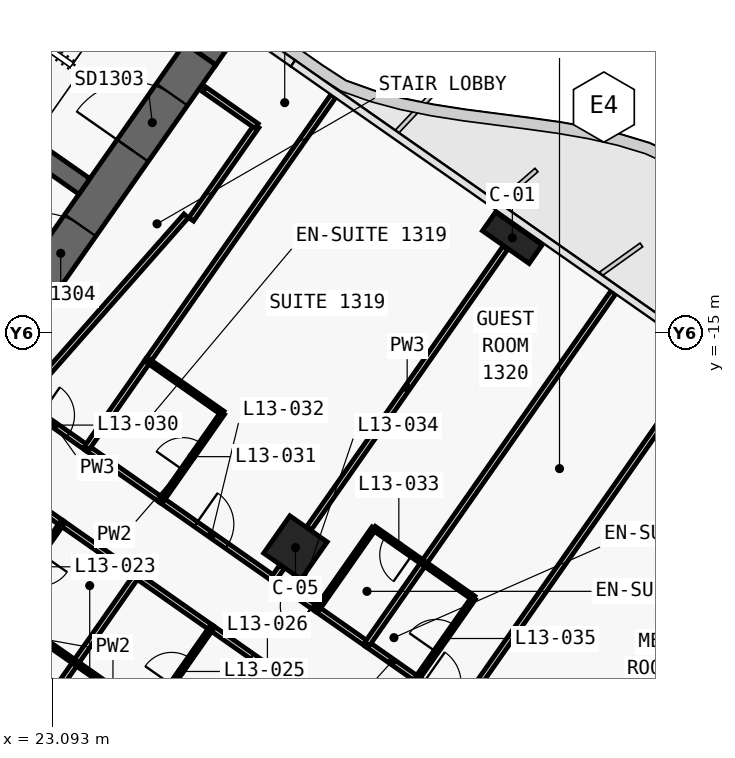
"""IFC4 building model, lengths in metres.
Left out: names, types, materials, properties, quantities, classifications, styles, units other than length and angle.
Written with IfcOpenShell. Run it as: python <this file> out.ifc"""

import sys

from ifc_helpers import new_model, si_unit, direction, frame, frame_2d, origin, origin_2d, place, context, subcontext, project, spatial, polyline, rectangle, outline, extrude, element, fill, save


model = new_model("IFC4")
c1 = context("Model", 3, precision=1e-05, world=origin(), true_north=direction((0.0, 1.0)))
c2 = subcontext(c1, "Body", "Model", "MODEL_VIEW")
j1 = project(units=[si_unit("LENGTHUNIT", "METRE"), si_unit("PLANEANGLEUNIT", "RADIAN")], contexts=[c1])
p1 = place(None, origin())
s1 = spatial("IfcSite", under=j1, at=p1, CompositionType="ELEMENT")
p2 = place(p1, origin())
s2 = spatial("IfcBuilding", under=s1, at=p2, CompositionType="ELEMENT")
p3 = place(p2, frame((0.0, 0.0, 72.5)))
s3 = spatial("IfcBuildingStorey", under=s2, at=p3, CompositionType="ELEMENT", Elevation=72.5)
p4 = place(p3, frame((-0.037, 11.867, 0.0), z_axis=(0.0, 0.0, 1.0), x_axis=(0.819155306259, -0.573571777746, 0.0)))
e1 = element("IfcWall", 1, at=p4, inside=s3, PredefinedType="SHEAR", context=c2, shape_type="SweptSolid", body=[
    extrude(outline(polyline([(33.837, 0.5), (0.0, 0.5), (0.7, -0.5), (33.837, -0.5), (33.837, 0.5)])), origin(), (0.0, 0.0, 1.0), 3.6),
])
p5 = place(p3, frame((21.708, -15.2, 0.0), z_axis=(0.0, 0.0, 1.0), x_axis=(0.573576324356, 0.819152122709, 0.0)))
e2 = element("IfcWall", 2, at=p5, inside=s3, PredefinedType="SHEAR", context=c2, shape_type="SweptSolid", body=[
    extrude(outline(polyline([(9.2, 0.5), (0.0, 0.5), (0.0, -0.5), (9.2, -0.5), (9.2, 0.5)])), origin(), (0.0, 0.0, 1.0), 3.6),
])
p6 = place(p5, frame((6.1, 0.0, 0.0)))
e3 = element("IfcOpeningElement", 3, at=p6, cuts=e2, PredefinedType="OPENING", context=c2, shape_type="SweptSolid", body=[
    extrude(rectangle(XDim=1.8, YDim=2.1, at=frame_2d((0.9, 1.05))), frame((0.0, 0.51, 0.0), z_axis=(0.0, -1.0, 0.0), x_axis=(1.0, 0.0, 0.0)), (0.0, 0.0, 1.0), 1.02),
])
p7 = place(p5, frame((1.9, 0.0, 0.0)))
e4 = element("IfcOpeningElement", 4, at=p7, cuts=e2, PredefinedType="OPENING", context=c2, shape_type="SweptSolid", body=[
    extrude(rectangle(XDim=1.8, YDim=2.1, at=frame_2d((0.9, 1.05))), frame((0.0, 0.51, 0.0), z_axis=(0.0, -1.0, 0.0), x_axis=(1.0, 0.0, 0.0)), (0.0, 0.0, 1.0), 1.02),
])
p8 = place(p3, frame((2.638, 3.768, 0.0), z_axis=(0.0, 0.0, 1.0), x_axis=(0.819148977158, -0.573580816643, 0.0)))
e5 = element("IfcWall", 5, at=p8, inside=s3, PredefinedType="SHEAR", context=c2, shape_type="SweptSolid", body=[
    extrude(outline(polyline([(0.0, 0.25), (0.0, -0.25), (26.0, -0.25), (26.0, 0.25), (0.0, 0.25)])), origin(), (0.0, 0.0, 1.0), 3.6),
])
p9 = place(p8, frame((9.637, 0.0, 0.0)))
e6 = element("IfcOpeningElement", 6, at=p9, cuts=e5, PredefinedType="OPENING", context=c2, shape_type="SweptSolid", body=[
    extrude(rectangle(XDim=1.2, YDim=2.1, at=frame_2d((0.6, 1.05))), frame((0.0, 0.26, 0.0), z_axis=(0.0, -1.0, 0.0), x_axis=(1.0, 0.0, 0.0)), (0.0, 0.0, 1.0), 0.52),
])
p10 = place(p8, frame((11.812, 0.0, 0.0)))
e7 = element("IfcOpeningElement", 7, at=p10, cuts=e5, PredefinedType="OPENING", context=c2, shape_type="SweptSolid", body=[
    extrude(rectangle(XDim=1.2, YDim=2.1, at=frame_2d((0.6, 1.05))), frame((0.0, 0.26, 0.0), z_axis=(0.0, -1.0, 0.0), x_axis=(1.0, 0.0, 0.0)), (0.0, 0.0, 1.0), 0.52),
])
p11 = place(p8, frame((13.988, 0.0, 0.0)))
e8 = element("IfcOpeningElement", 8, at=p11, cuts=e5, PredefinedType="OPENING", context=c2, shape_type="SweptSolid", body=[
    extrude(rectangle(XDim=1.2, YDim=2.1, at=frame_2d((0.6, 1.05))), frame((0.0, 0.26, 0.0), z_axis=(0.0, -1.0, 0.0), x_axis=(1.0, 0.0, 0.0)), (0.0, 0.0, 1.0), 0.52),
])
p12 = place(p8, frame((16.262, 0.0, 0.0)))
e9 = element("IfcOpeningElement", 9, at=p12, cuts=e5, PredefinedType="OPENING", context=c2, shape_type="SweptSolid", body=[
    extrude(rectangle(XDim=1.0, YDim=2.1, at=frame_2d((0.5, 1.05))), frame((0.0, 0.26, 0.0), z_axis=(0.0, -1.0, 0.0), x_axis=(1.0, 0.0, 0.0)), (0.0, 0.0, 1.0), 0.52),
])
p13 = place(p3, frame((35.197, -12.498, 0.0), z_axis=(0.0, 0.0, 1.0), x_axis=(0.819152044289, -0.573576436351, 0.0)))
e10 = element("IfcColumn", 10, at=p13, inside=s3, PredefinedType="COLUMN", context=c2, shape_type="SweptSolid", body=[
    extrude(rectangle(XDim=1.5, YDim=0.6, at=origin_2d()), origin(), (0.0, 0.0, 1.0), 3.6),
])
p14 = place(p3, frame((29.49, -20.649, 0.0), z_axis=(0.0, 0.0, 1.0), x_axis=(0.819152044289, -0.573576436351, 0.0)))
e11 = element("IfcColumn", 11, at=p14, inside=s3, PredefinedType="COLUMN", context=c2, shape_type="SweptSolid", body=[
    extrude(rectangle(XDim=1.2, YDim=1.2, at=origin_2d()), origin(), (0.0, 0.0, 1.0), 3.6),
])
p15 = place(p3, frame((22.284, -16.824, 0.0), z_axis=(0.0, 0.0, 1.0), x_axis=(0.819160859995, -0.573563846013, 0.0)))
e12 = element("IfcWall", 12, at=p15, inside=s3, PredefinedType="PARTITIONING", context=c2, shape_type="SweptSolid", body=[
    extrude(rectangle(XDim=2.098, YDim=0.15, at=frame_2d((1.049, 0.0))), origin(), (0.0, 0.0, 1.0), 3.32),
])
p16 = place(p15, frame((0.599, 0.0, 0.0)))
e13 = element("IfcOpeningElement", 13, at=p16, cuts=e12, PredefinedType="OPENING", context=c2, shape_type="SweptSolid", body=[
    extrude(rectangle(XDim=0.9, YDim=2.1, at=frame_2d((0.45, 1.05))), frame((0.0, 0.085, 0.0), z_axis=(0.0, -1.0, 0.0), x_axis=(1.0, 0.0, 0.0)), (0.0, 0.0, 1.0), 0.17),
])
p17 = place(p3, frame((25.966, -19.403, 0.0), z_axis=(0.0, 0.0, 1.0), x_axis=(0.81917779803, -0.57353965444, 0.0)))
e14 = element("IfcWall", 14, at=p17, inside=s3, PredefinedType="PARTITIONING", context=c2, shape_type="SweptSolid", body=[
    extrude(rectangle(XDim=3.603, YDim=0.15, at=frame_2d((1.801, 0.0))), origin(), (0.0, 0.0, 1.0), 2.6),
])
p18 = place(p17, frame((1.101, 0.0, 0.0)))
e15 = element("IfcOpeningElement", 15, at=p18, cuts=e14, PredefinedType="OPENING", context=c2, shape_type="SweptSolid", body=[
    extrude(rectangle(XDim=1.0, YDim=2.1, at=frame_2d((0.5, 1.05))), frame((0.0, 0.085, 0.0), z_axis=(0.0, -1.0, 0.0), x_axis=(1.0, 0.0, 0.0)), (0.0, 0.0, 1.0), 0.17),
])
p19 = place(p3, frame((23.999, -18.025, 0.0), z_axis=(0.0, 0.0, 1.0), x_axis=(0.819146032251, -0.573585022335, 0.0)))
e16 = element("IfcWall", 16, at=p19, inside=s3, PredefinedType="PARTITIONING", context=c2, shape_type="SweptSolid", body=[
    extrude(rectangle(XDim=2.404, YDim=0.15, at=frame_2d((1.202, 0.0))), origin(), (0.0, 0.0, 1.0), 3.32),
])
p20 = place(p3, frame((30.063, -22.271, 0.0), z_axis=(0.0, 0.0, 1.0), x_axis=(-0.81914197737, 0.573590813132, 0.0)))
e17 = element("IfcWall", 17, at=p20, inside=s3, PredefinedType="PARTITIONING", context=c2, shape_type="SweptSolid", body=[
    extrude(rectangle(XDim=1.403, YDim=0.15, at=frame_2d((0.701, 0.0))), origin(), (0.0, 0.0, 1.0), 2.6),
])
p21 = place(p20, frame((0.15, 0.0, 0.0)))
e18 = element("IfcOpeningElement", 18, at=p21, cuts=e17, PredefinedType="OPENING", context=c2, shape_type="SweptSolid", body=[
    extrude(rectangle(XDim=0.85, YDim=2.1, at=frame_2d((0.425, 1.05))), frame((0.0, 0.085, 0.0), z_axis=(0.0, -1.0, 0.0), x_axis=(1.0, 0.0, 0.0)), (0.0, 0.0, 1.0), 0.17),
])
p22 = place(p3, frame((30.061, -22.27, 0.0), z_axis=(0.0, 0.0, 1.0), x_axis=(0.819189013667, -0.573523634986, 0.0)))
e19 = element("IfcWall", 19, at=p22, inside=s3, PredefinedType="PARTITIONING", context=c2, shape_type="SweptSolid", body=[
    extrude(rectangle(XDim=1.604, YDim=0.15, at=frame_2d((0.802, 0.0))), origin(), (0.0, 0.0, 1.0), 3.32),
])
p23 = place(p3, frame((32.683, -24.106, 0.0), z_axis=(0.0, 0.0, 1.0), x_axis=(0.819199220913, -0.573509055252, 0.0)))
e20 = element("IfcWall", 20, at=p23, inside=s3, PredefinedType="PARTITIONING", context=c2, shape_type="SweptSolid", body=[
    extrude(rectangle(XDim=1.403, YDim=0.15, at=frame_2d((0.702, 0.0))), origin(), (0.0, 0.0, 1.0), 3.32),
])
p24 = place(p23, frame((0.201, 0.0, 0.0)))
e21 = element("IfcOpeningElement", 21, at=p24, cuts=e20, PredefinedType="OPENING", context=c2, shape_type="SweptSolid", body=[
    extrude(rectangle(XDim=1.0, YDim=2.1, at=frame_2d((0.5, 1.05))), frame((0.0, 0.085, 0.0), z_axis=(0.0, -1.0, 0.0), x_axis=(1.0, 0.0, 0.0)), (0.0, 0.0, 1.0), 0.17),
])
p25 = place(p3, frame((31.372, -23.188, 0.0), z_axis=(0.0, 0.0, 1.0), x_axis=(0.819189013667, -0.573523634986, 0.0)))
e22 = element("IfcWall", 22, at=p25, inside=s3, PredefinedType="PARTITIONING", context=c2, shape_type="SweptSolid", body=[
    extrude(rectangle(XDim=1.604, YDim=0.15, at=frame_2d((0.802, 0.0))), origin(), (0.0, 0.0, 1.0), 3.32),
])
p26 = place(p3, frame((23.346, -20.01, 0.0), z_axis=(0.0, 0.0, 1.0), x_axis=(-0.819145961204, 0.573585123798, 0.0)))
e23 = element("IfcWall", 23, at=p26, inside=s3, PredefinedType="PARTITIONING", context=c2, shape_type="SweptSolid", body=[
    extrude(rectangle(XDim=3.603, YDim=0.15, at=frame_2d((1.802, 0.0))), origin(), (0.0, 0.0, 1.0), 2.6),
])
p27 = place(p26, frame((1.301, 0.0, 0.0)))
e24 = element("IfcOpeningElement", 24, at=p27, cuts=e23, PredefinedType="OPENING", context=c2, shape_type="SweptSolid", body=[
    extrude(rectangle(XDim=1.0, YDim=2.1, at=frame_2d((0.5, 1.05))), frame((0.0, 0.085, 0.0), z_axis=(0.0, -1.0, 0.0), x_axis=(1.0, 0.0, 0.0)), (0.0, 0.0, 1.0), 0.17),
])
p28 = place(p3, frame((25.313, -21.387, 0.0), z_axis=(0.0, 0.0, 1.0), x_axis=(-0.819146032251, 0.573585022335, 0.0)))
e25 = element("IfcWall", 25, at=p28, inside=s3, PredefinedType="PARTITIONING", context=c2, shape_type="SweptSolid", body=[
    extrude(rectangle(XDim=2.404, YDim=0.15, at=frame_2d((1.202, 0.0))), origin(), (0.0, 0.0, 1.0), 3.32),
])
p29 = place(p3, frame((30.228, -24.828, 0.0), z_axis=(0.0, 0.0, 1.0), x_axis=(-0.819145961204, 0.573585123798, 0.0)))
e26 = element("IfcWall", 26, at=p29, inside=s3, PredefinedType="PARTITIONING", context=c2, shape_type="SweptSolid", body=[
    extrude(rectangle(XDim=3.603, YDim=0.15, at=frame_2d((1.802, 0.0))), origin(), (0.0, 0.0, 1.0), 2.6),
])
p30 = place(p29, frame((1.302, 0.0, 0.0)))
e27 = element("IfcOpeningElement", 27, at=p30, cuts=e26, PredefinedType="OPENING", context=c2, shape_type="SweptSolid", body=[
    extrude(rectangle(XDim=1.0, YDim=2.1, at=frame_2d((0.5, 1.05))), frame((0.0, 0.085, 0.0), z_axis=(0.0, -1.0, 0.0), x_axis=(1.0, 0.0, 0.0)), (0.0, 0.0, 1.0), 0.17),
])
p31 = place(p3, frame((27.279, -22.763, 0.0), z_axis=(0.0, 0.0, 1.0), x_axis=(-0.819146032251, 0.573585022335, 0.0)))
e28 = element("IfcWall", 28, at=p31, inside=s3, PredefinedType="PARTITIONING", context=c2, shape_type="SweptSolid", body=[
    extrude(rectangle(XDim=2.404, YDim=0.15, at=frame_2d((1.202, 0.0))), origin(), (0.0, 0.0, 1.0), 3.32),
])
p32 = place(p3, frame((30.482, -8.77, 0.0), z_axis=(0.0, 0.0, 1.0), x_axis=(-0.573576058406, -0.819152308929, 0.0)))
e29 = element("IfcWall", 29, at=p32, inside=s3, PredefinedType="PARTITIONING", context=c2, shape_type="SweptSolid", body=[
    extrude(rectangle(XDim=8.501, YDim=0.15, at=frame_2d((4.25, 0.0))), origin(), (0.0, 0.0, 1.0), 2.6),
])
p33 = place(p3, frame((25.608, -15.731, 0.0), z_axis=(0.0, 0.0, 1.0), x_axis=(-0.573596837309, -0.819137759006, 0.0)))
e30 = element("IfcWall", 30, at=p33, inside=s3, PredefinedType="PARTITIONING", context=c2, shape_type="SweptSolid", body=[
    extrude(rectangle(XDim=2.802, YDim=0.15, at=frame_2d((1.401, 0.0))), origin(), (0.0, 0.0, 1.0), 2.6),
])
p34 = place(p3, frame((22.285, -16.825, 0.0), z_axis=(0.0, 0.0, 1.0), x_axis=(0.661551268245, 0.749899939647, 0.0)))
e31 = element("IfcWall", 31, at=p34, inside=s3, PredefinedType="PARTITIONING", context=c2, shape_type="SweptSolid", body=[
    extrude(rectangle(XDim=6.541, YDim=0.15, at=frame_2d((3.271, 0.0))), origin(), (0.0, 0.0, 1.0), 2.6),
])
p35 = place(p3, frame((26.746, -12.014, 0.0), z_axis=(0.0, 0.0, 1.0), x_axis=(0.573560650686, 0.819163097304, 0.0)))
e32 = element("IfcWall", 32, at=p35, inside=s3, PredefinedType="PARTITIONING", context=c2, shape_type="SweptSolid", body=[
    extrude(rectangle(XDim=3.0, YDim=0.15, at=frame_2d((1.5, 0.0))), origin(), (0.0, 0.0, 1.0), 3.32),
])
p36 = place(p3, frame((28.467, -9.556, 0.0), z_axis=(0.0, 0.0, 1.0), x_axis=(-0.819109000826, 0.573637903879, 0.0)))
e33 = element("IfcWall", 33, at=p36, inside=s3, PredefinedType="PARTITIONING", context=c2, shape_type="SweptSolid", body=[
    extrude(rectangle(XDim=1.68, YDim=0.15, at=frame_2d((0.84, 0.0))), origin(), (0.0, 0.0, 1.0), 3.32),
])
p37 = place(p3, frame((25.968, -19.404, 0.0), z_axis=(0.0, 0.0, 1.0), x_axis=(0.573591086599, 0.819141785879, 0.0)))
e34 = element("IfcWall", 34, at=p37, inside=s3, PredefinedType="PARTITIONING", context=c2, shape_type="SweptSolid", body=[
    extrude(rectangle(XDim=2.8, YDim=0.12, at=frame_2d((1.4, 0.0))), origin(), (0.0, 0.0, 1.0), 2.6),
])
p38 = place(p37, frame((0.975, 0.0, 0.0)))
e35 = element("IfcOpeningElement", 35, at=p38, cuts=e34, PredefinedType="OPENING", context=c2, shape_type="SweptSolid", body=[
    extrude(rectangle(XDim=0.85, YDim=2.05, at=frame_2d((0.425, 1.025))), frame((0.0, 0.07, 0.0), z_axis=(0.0, -1.0, 0.0), x_axis=(1.0, 0.0, 0.0)), (0.0, 0.0, 1.0), 0.14),
])
p39 = place(p3, frame((27.573, -17.109, 0.0), z_axis=(0.0, 0.0, 1.0), x_axis=(-0.819107643868, 0.573639841501, 0.0)))
e36 = element("IfcWall", 36, at=p39, inside=s3, PredefinedType="PARTITIONING", context=c2, shape_type="SweptSolid", body=[
    extrude(rectangle(XDim=2.4, YDim=0.12, at=frame_2d((1.2, 0.0))), origin(), (0.0, 0.0, 1.0), 3.32),
])
p40 = place(p3, frame((35.013, -12.76, 0.0), z_axis=(0.0, 0.0, 1.0), x_axis=(-0.573558725113, -0.819164445546, 0.0)))
e37 = element("IfcWall", 37, at=p40, inside=s3, PredefinedType="PARTITIONING", context=c2, shape_type="SweptSolid", body=[
    extrude(rectangle(XDim=9.01, YDim=0.15, at=frame_2d((4.505, 0.0))), origin(), (0.0, 0.0, 1.0), 2.6),
])
p41 = place(p3, frame((29.134, -21.156, 0.0), z_axis=(0.0, 0.0, 1.0), x_axis=(-0.572944929411, -0.819593867633, 0.0)))
e38 = element("IfcWall", 38, at=p41, inside=s3, PredefinedType="PARTITIONING", context=c2, shape_type="SweptSolid", body=[
    extrude(rectangle(XDim=0.38, YDim=0.15, at=frame_2d((0.19, 0.0))), origin(), (0.0, 0.0, 1.0), 2.6),
])
p42 = place(p3, frame((32.865, -21.058, 0.0), z_axis=(0.0, 0.0, 1.0), x_axis=(-0.819131543282, 0.57360571371, 0.0)))
e39 = element("IfcWall", 39, at=p42, inside=s3, PredefinedType="PARTITIONING", context=c2, shape_type="SweptSolid", body=[
    extrude(rectangle(XDim=1.6, YDim=0.12, at=frame_2d((0.8, 0.0))), origin(), (0.0, 0.0, 1.0), 3.32),
])
p43 = place(p42, frame((0.375, 0.0, 0.0)))
e40 = element("IfcOpeningElement", 40, at=p43, cuts=e39, PredefinedType="OPENING", context=c2, shape_type="SweptSolid", body=[
    extrude(rectangle(XDim=0.85, YDim=2.05, at=frame_2d((0.425, 1.025))), frame((0.0, 0.07, 0.0), z_axis=(0.0, -1.0, 0.0), x_axis=(1.0, 0.0, 0.0)), (0.0, 0.0, 1.0), 0.14),
])
p44 = place(p3, frame((31.553, -20.14, 0.0), z_axis=(0.0, 0.0, 1.0), x_axis=(-0.573537965655, -0.819178980414, 0.0)))
e41 = element("IfcWall", 41, at=p44, inside=s3, PredefinedType="PARTITIONING", context=c2, shape_type="SweptSolid", body=[
    extrude(rectangle(XDim=2.6, YDim=0.12, at=frame_2d((1.3, 0.0))), origin(), (0.0, 0.0, 1.0), 2.6),
])
p45 = place(p3, frame((37.855, -13.932, 0.0), z_axis=(0.0, 0.0, 1.0), x_axis=(-0.573564051961, -0.819160715792, 0.0)))
e42 = element("IfcWall", 42, at=p45, inside=s3, PredefinedType="PARTITIONING", context=c2, shape_type="SweptSolid", body=[
    extrude(rectangle(XDim=8.699, YDim=0.15, at=frame_2d((4.35, 0.0))), origin(), (0.0, 0.0, 1.0), 2.5),
])
p46 = place(p3, frame((32.865, -21.059, 0.0), z_axis=(0.0, 0.0, 1.0), x_axis=(-0.573600972199, -0.819134863556, 0.0)))
e43 = element("IfcWall", 43, at=p46, inside=s3, PredefinedType="PARTITIONING", context=c2, shape_type="SweptSolid", body=[
    extrude(rectangle(XDim=2.6, YDim=0.15, at=frame_2d((1.3, 0.0))), origin(), (0.0, 0.0, 1.0), 2.6),
])
p47 = place(p3, frame((32.685, -24.107, 0.0), z_axis=(0.0, 0.0, 1.0), x_axis=(0.573537965655, 0.819178980414, 0.0)))
e44 = element("IfcWall", 44, at=p47, inside=s3, PredefinedType="PARTITIONING", context=c2, shape_type="SweptSolid", body=[
    extrude(rectangle(XDim=2.6, YDim=0.12, at=frame_2d((1.3, 0.0))), origin(), (0.0, 0.0, 1.0), 2.6),
])
p48 = place(p47, frame((0.875, 0.0, 0.0)))
e45 = element("IfcOpeningElement", 45, at=p48, cuts=e44, PredefinedType="OPENING", context=c2, shape_type="SweptSolid", body=[
    extrude(rectangle(XDim=0.85, YDim=2.05, at=frame_2d((0.425, 1.025))), frame((0.0, 0.07, 0.0), z_axis=(0.0, -1.0, 0.0), x_axis=(1.0, 0.0, 0.0)), (0.0, 0.0, 1.0), 0.14),
])
p49 = place(p3, frame((34.176, -21.976, 0.0), z_axis=(0.0, 0.0, 1.0), x_axis=(-0.819203241359, 0.573503312412, 0.0)))
e46 = element("IfcWall", 46, at=p49, inside=s3, PredefinedType="PARTITIONING", context=c2, shape_type="SweptSolid", body=[
    extrude(rectangle(XDim=1.6, YDim=0.12, at=frame_2d((0.8, 0.0))), origin(), (0.0, 0.0, 1.0), 3.32),
])
p50 = place(p3, frame((39.649, -16.6, 0.0), z_axis=(0.0, 0.0, 1.0), x_axis=(-0.573567334802, -0.819158417187, 0.0)))
e47 = element("IfcWall", 47, at=p50, inside=s3, PredefinedType="PARTITIONING", context=c2, shape_type="SweptSolid", body=[
    extrude(rectangle(XDim=10.144, YDim=0.15, at=frame_2d((5.072, 0.0))), origin(), (0.0, 0.0, 1.0), 2.6),
])
p51 = place(p3, frame((23.344, -20.008, 0.0), z_axis=(0.0, 0.0, 1.0), x_axis=(-0.573550118428, -0.819170471667, 0.0)))
e48 = element("IfcWall", 48, at=p51, inside=s3, PredefinedType="PARTITIONING", context=c2, shape_type="SweptSolid", body=[
    extrude(rectangle(XDim=2.8, YDim=0.12, at=frame_2d((1.4, 0.0))), origin(), (0.0, 0.0, 1.0), 3.32),
])
p52 = place(p51, frame((0.975, 0.0, 0.0)))
e49 = element("IfcOpeningElement", 49, at=p52, cuts=e48, PredefinedType="OPENING", context=c2, shape_type="SweptSolid", body=[
    extrude(rectangle(XDim=0.85, YDim=2.05, at=frame_2d((0.425, 1.025))), frame((0.0, 0.07, 0.0), z_axis=(0.0, -1.0, 0.0), x_axis=(1.0, 0.0, 0.0)), (0.0, 0.0, 1.0), 0.14),
])
p53 = place(p3, frame((21.739, -22.303, 0.0), z_axis=(0.0, 0.0, 1.0), x_axis=(0.819107643868, -0.573639841501, 0.0)))
e50 = element("IfcWall", 50, at=p53, inside=s3, PredefinedType="PARTITIONING", context=c2, shape_type="SweptSolid", body=[
    extrude(rectangle(XDim=2.4, YDim=0.12, at=frame_2d((1.2, 0.0))), origin(), (0.0, 0.0, 1.0), 3.32),
])
p54 = place(p3, frame((23.705, -23.68, 0.0), z_axis=(0.0, 0.0, 1.0), x_axis=(-0.573553393703, -0.819168178442, 0.0)))
e51 = element("IfcWall", 51, at=p54, inside=s3, PredefinedType="PARTITIONING", context=c2, shape_type="SweptSolid", body=[
    extrude(rectangle(XDim=4.499, YDim=0.15, at=frame_2d((2.25, 0.0))), origin(), (0.0, 0.0, 1.0), 2.5),
])
p55 = place(p3, frame((25.311, -21.385, 0.0), z_axis=(0.0, 0.0, 1.0), x_axis=(-0.573550118428, -0.819170471667, 0.0)))
e52 = element("IfcWall", 52, at=p55, inside=s3, PredefinedType="PARTITIONING", context=c2, shape_type="SweptSolid", body=[
    extrude(rectangle(XDim=2.8, YDim=0.15, at=frame_2d((1.4, 0.0))), origin(), (0.0, 0.0, 1.0), 3.32),
])
p56 = place(p3, frame((23.705, -23.68, 0.0), z_axis=(0.0, 0.0, 1.0), x_axis=(0.819188907105, -0.573523787192, 0.0)))
e53 = element("IfcWall", 53, at=p56, inside=s3, PredefinedType="PARTITIONING", context=c2, shape_type="SweptSolid", body=[
    extrude(rectangle(XDim=2.4, YDim=0.12, at=frame_2d((1.2, 0.0))), origin(), (0.0, 0.0, 1.0), 3.32),
])
p57 = place(p3, frame((25.672, -25.056, 0.0), z_axis=(0.0, 0.0, 1.0), x_axis=(0.573550118428, 0.819170471667, 0.0)))
e54 = element("IfcWall", 54, at=p57, inside=s3, PredefinedType="PARTITIONING", context=c2, shape_type="SweptSolid", body=[
    extrude(rectangle(XDim=2.8, YDim=0.12, at=frame_2d((1.4, 0.0))), origin(), (0.0, 0.0, 1.0), 3.32),
])
p58 = place(p57, frame((0.975, 0.0, 0.0)))
e55 = element("IfcOpeningElement", 55, at=p58, cuts=e54, PredefinedType="OPENING", context=c2, shape_type="SweptSolid", body=[
    extrude(rectangle(XDim=0.85, YDim=2.05, at=frame_2d((0.425, 1.025))), frame((0.0, 0.07, 0.0), z_axis=(0.0, -1.0, 0.0), x_axis=(1.0, 0.0, 0.0)), (0.0, 0.0, 1.0), 0.14),
])
p59 = place(p6, origin())
e56 = element("IfcDoor", 56, at=p59, inside=s3, OperationType="DOUBLE_DOOR_SINGLE_SWING", PredefinedType="DOOR", context=c2, shape_type="SweptSolid", body=[
    extrude(rectangle(XDim=1.8, YDim=2.1, at=frame_2d((0.9, 1.05))), frame((0.0, 0.025, 0.0), z_axis=(0.0, -1.0, 0.0), x_axis=(1.0, 0.0, 0.0)), (0.0, 0.0, 1.0), 0.05),
])
fill(e3, e56)
p60 = place(p7, origin())
e57 = element("IfcDoor", 57, at=p60, inside=s3, OperationType="DOUBLE_DOOR_SINGLE_SWING", PredefinedType="DOOR", context=c2, shape_type="SweptSolid", body=[
    extrude(rectangle(XDim=1.8, YDim=2.1, at=frame_2d((0.9, 1.05))), frame((0.0, 0.025, 0.0), z_axis=(0.0, -1.0, 0.0), x_axis=(1.0, 0.0, 0.0)), (0.0, 0.0, 1.0), 0.05),
])
fill(e4, e57)
p61 = place(p58, origin())
e58 = element("IfcDoor", 58, at=p61, inside=s3, OperationType="SINGLE_SWING_LEFT", PredefinedType="DOOR", context=c2, shape_type="SweptSolid", body=[
    extrude(rectangle(XDim=0.85, YDim=2.05, at=frame_2d((0.425, 1.025))), frame((0.0, 0.025, 0.0), z_axis=(0.0, -1.0, 0.0), x_axis=(1.0, 0.0, 0.0)), (0.0, 0.0, 1.0), 0.05),
])
fill(e55, e58)
p62 = place(p30, origin())
e59 = element("IfcDoor", 59, at=p62, inside=s3, OperationType="SINGLE_SWING_RIGHT", PredefinedType="DOOR", context=c2, shape_type="SweptSolid", body=[
    extrude(rectangle(XDim=1.0, YDim=2.1, at=frame_2d((0.5, 1.05))), frame((0.0, 0.025, 0.0), z_axis=(0.0, -1.0, 0.0), x_axis=(1.0, 0.0, 0.0)), (0.0, 0.0, 1.0), 0.05),
])
fill(e27, e59)
p63 = place(p16, origin())
e60 = element("IfcDoor", 60, at=p63, inside=s3, OperationType="SINGLE_SWING_RIGHT", PredefinedType="DOOR", context=c2, shape_type="SweptSolid", body=[
    extrude(rectangle(XDim=0.9, YDim=2.1, at=frame_2d((0.45, 1.05))), frame((0.0, 0.025, 0.0), z_axis=(0.0, -1.0, 0.0), x_axis=(1.0, 0.0, 0.0)), (0.0, 0.0, 1.0), 0.05),
])
fill(e13, e60)
p64 = place(p38, origin())
e61 = element("IfcDoor", 61, at=p64, inside=s3, OperationType="SINGLE_SWING_LEFT", PredefinedType="DOOR", context=c2, shape_type="SweptSolid", body=[
    extrude(rectangle(XDim=0.85, YDim=2.05, at=frame_2d((0.425, 1.025))), frame((0.0, 0.025, 0.0), z_axis=(0.0, -1.0, 0.0), x_axis=(1.0, 0.0, 0.0)), (0.0, 0.0, 1.0), 0.05),
])
fill(e35, e61)
p65 = place(p18, origin())
e62 = element("IfcDoor", 62, at=p65, inside=s3, OperationType="SINGLE_SWING_RIGHT", PredefinedType="DOOR", context=c2, shape_type="SweptSolid", body=[
    extrude(rectangle(XDim=1.0, YDim=2.1, at=frame_2d((0.5, 1.05))), frame((0.0, 0.025, 0.0), z_axis=(0.0, -1.0, 0.0), x_axis=(1.0, 0.0, 0.0)), (0.0, 0.0, 1.0), 0.05),
])
fill(e15, e62)
p66 = place(p43, origin())
e63 = element("IfcDoor", 63, at=p66, inside=s3, OperationType="SINGLE_SWING_LEFT", PredefinedType="DOOR", context=c2, shape_type="SweptSolid", body=[
    extrude(rectangle(XDim=0.85, YDim=2.05, at=frame_2d((0.425, 1.025))), frame((0.0, 0.025, 0.0), z_axis=(0.0, -1.0, 0.0), x_axis=(1.0, 0.0, 0.0)), (0.0, 0.0, 1.0), 0.05),
])
fill(e40, e63)
p67 = place(p21, origin())
e64 = element("IfcDoor", 64, at=p67, inside=s3, OperationType="SINGLE_SWING_LEFT", PredefinedType="DOOR", context=c2, shape_type="SweptSolid", body=[
    extrude(rectangle(XDim=0.85, YDim=2.1, at=frame_2d((0.425, 1.05))), frame((0.0, 0.025, 0.0), z_axis=(0.0, -1.0, 0.0), x_axis=(1.0, 0.0, 0.0)), (0.0, 0.0, 1.0), 0.05),
])
fill(e18, e64)
p68 = place(p48, origin())
e65 = element("IfcDoor", 65, at=p68, inside=s3, OperationType="SINGLE_SWING_RIGHT", PredefinedType="DOOR", context=c2, shape_type="SweptSolid", body=[
    extrude(rectangle(XDim=0.85, YDim=2.05, at=frame_2d((0.425, 1.025))), frame((0.0, 0.025, 0.0), z_axis=(0.0, -1.0, 0.0), x_axis=(1.0, 0.0, 0.0)), (0.0, 0.0, 1.0), 0.05),
])
fill(e45, e65)
save(model, sys.argv[1])
